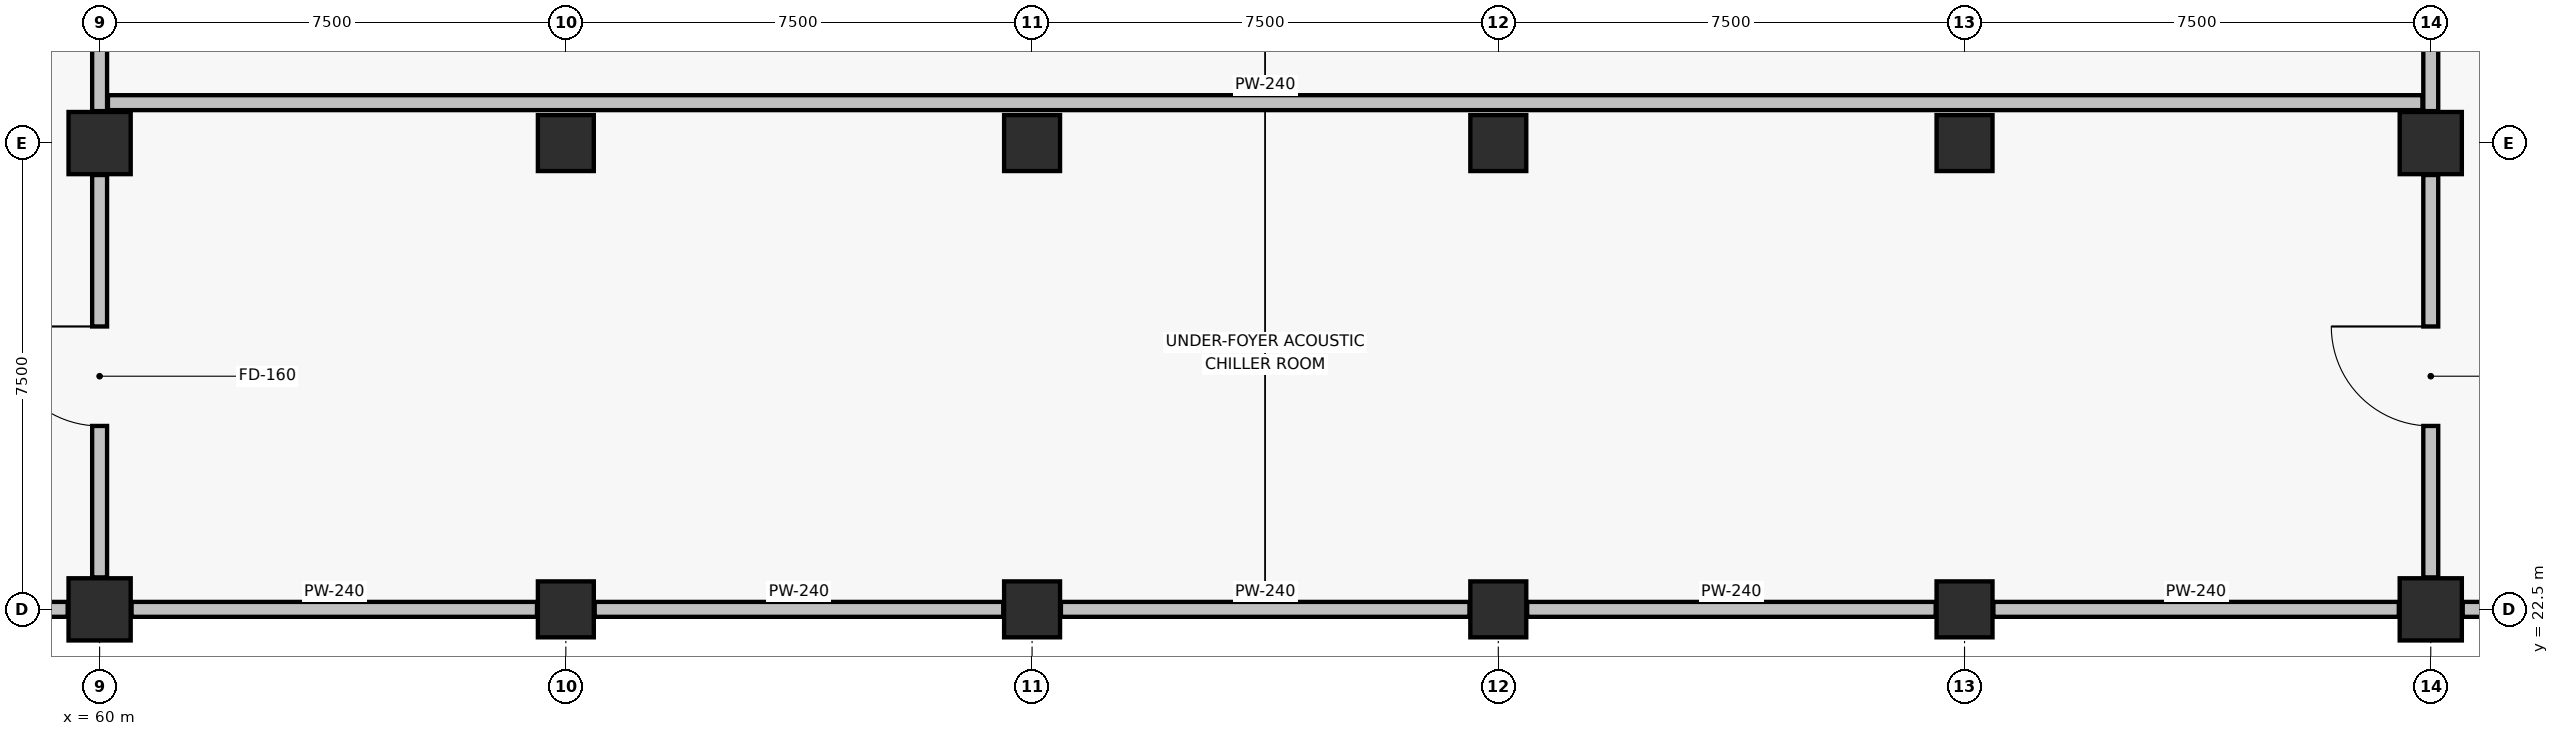
"""IFC4 building model, lengths in metres.
Left out: names, types, materials, properties, quantities, classifications, styles, units other than length and angle.
Written with IfcOpenShell. Run it as: python <this file> out.ifc"""

import sys

from ifc_helpers import new_model, si_unit, direction, frame, frame_2d, origin, origin_2d, place, context, subcontext, project, spatial, rectangle, extrude, element, fill, save


model = new_model("IFC4")
c1 = context("Model", 3, precision=1e-05, world=origin(), true_north=direction((0.0, 1.0)))
c2 = subcontext(c1, "Body", "Model", "MODEL_VIEW")
j1 = project(units=[si_unit("LENGTHUNIT", "METRE"), si_unit("PLANEANGLEUNIT", "RADIAN")], contexts=[c1])
p1 = place(None, origin())
s1 = spatial("IfcSite", under=j1, at=p1, CompositionType="ELEMENT")
p2 = place(p1, origin())
s2 = spatial("IfcBuilding", under=s1, at=p2, CompositionType="ELEMENT")
p3 = place(p2, frame((0.0, 0.0, -4.8)))
s3 = spatial("IfcBuildingStorey", under=s2, at=p3, CompositionType="ELEMENT", Elevation=-4.8)
for number, where, z_axis, x_axis in (
    (1, (60.0, 22.5, 0.0), (0.0, 0.0, 1.0), (1.0, 0.0, 0.0)),
    (2, (60.0, 30.0, 0.0), (0.0, 0.0, 1.0), (1.0, 0.0, 0.0)),
):
    element("IfcColumn", number, at=place(p3, frame(where, z_axis=z_axis, x_axis=x_axis)), inside=s3, PredefinedType="COLUMN", context=c2, shape_type="SweptSolid", body=[
        extrude(rectangle(XDim=1.0, YDim=1.0, at=origin_2d()), origin(), (0.0, 0.0, 1.0), 4.8),
    ])
for number, where, z_axis, x_axis in (
    (3, (67.5, 22.5, 0.0), (0.0, 0.0, 1.0), (1.0, 0.0, 0.0)),
    (4, (67.5, 30.0, 0.0), (0.0, 0.0, 1.0), (1.0, 0.0, 0.0)),
    (5, (75.0, 22.5, 0.0), (0.0, 0.0, 1.0), (1.0, 0.0, 0.0)),
    (6, (75.0, 30.0, 0.0), (0.0, 0.0, 1.0), (1.0, 0.0, 0.0)),
    (7, (82.5, 22.5, 0.0), (0.0, 0.0, 1.0), (1.0, 0.0, 0.0)),
    (8, (82.5, 30.0, 0.0), (0.0, 0.0, 1.0), (1.0, 0.0, 0.0)),
    (9, (90.0, 22.5, 0.0), (0.0, 0.0, 1.0), (1.0, 0.0, 0.0)),
    (10, (90.0, 30.0, 0.0), (0.0, 0.0, 1.0), (1.0, 0.0, 0.0)),
):
    element("IfcColumn", number, at=place(p3, frame(where, z_axis=z_axis, x_axis=x_axis)), inside=s3, PredefinedType="COLUMN", context=c2, shape_type="SweptSolid", body=[
        extrude(rectangle(XDim=0.9, YDim=0.9, at=origin_2d()), origin(), (0.0, 0.0, 1.0), 4.8),
    ])
for number, where, z_axis, x_axis in (
    (11, (97.5, 22.5, 0.0), (0.0, 0.0, 1.0), (1.0, 0.0, 0.0)),
    (12, (97.5, 30.0, 0.0), (0.0, 0.0, 1.0), (1.0, 0.0, 0.0)),
):
    element("IfcColumn", number, at=place(p3, frame(where, z_axis=z_axis, x_axis=x_axis)), inside=s3, PredefinedType="COLUMN", context=c2, shape_type="SweptSolid", body=[
        extrude(rectangle(XDim=1.0, YDim=1.0, at=origin_2d()), origin(), (0.0, 0.0, 1.0), 4.8),
    ])
p4 = place(p3, frame((53.014, 22.5, 0.0), z_axis=(0.0, 0.0, 1.0), x_axis=(1.0, 0.0, 0.0)))
e13 = element("IfcWall", 13, at=p4, inside=s3, PredefinedType="PARTITIONING", context=c2, shape_type="SweptSolid", body=[
    extrude(rectangle(XDim=6.472, YDim=0.24, at=frame_2d((3.236, 0.0))), origin(), (0.0, 0.0, 1.0), 3.87),
])
p5 = place(p3, frame((60.514, 22.5, 0.0), z_axis=(0.0, 0.0, 1.0), x_axis=(1.0, 0.0, 0.0)))
e14 = element("IfcWall", 14, at=p5, inside=s3, PredefinedType="PARTITIONING", context=c2, shape_type="SweptSolid", body=[
    extrude(rectangle(XDim=6.522, YDim=0.24, at=frame_2d((3.261, 0.0))), origin(), (0.0, 0.0, 1.0), 3.82),
])
for number, where, z_axis, x_axis in (
    (15, (67.964, 22.5, 0.0), (0.0, 0.0, 1.0), (1.0, 0.0, 0.0)),
    (16, (75.464, 22.5, 0.0), (0.0, 0.0, 1.0), (1.0, 0.0, 0.0)),
    (17, (82.964, 22.5, 0.0), (0.0, 0.0, 1.0), (1.0, 0.0, 0.0)),
):
    element("IfcWall", number, at=place(p3, frame(where, z_axis=z_axis, x_axis=x_axis)), inside=s3, PredefinedType="PARTITIONING", context=c2, shape_type="SweptSolid", body=[
        extrude(rectangle(XDim=6.572, YDim=0.24, at=frame_2d((3.286, 0.0))), origin(), (0.0, 0.0, 1.0), 3.82),
    ])
p6 = place(p3, frame((90.464, 22.5, 0.0), z_axis=(0.0, 0.0, 1.0), x_axis=(1.0, 0.0, 0.0)))
e18 = element("IfcWall", 18, at=p6, inside=s3, PredefinedType="PARTITIONING", context=c2, shape_type="SweptSolid", body=[
    extrude(rectangle(XDim=6.522, YDim=0.24, at=frame_2d((3.261, 0.0))), origin(), (0.0, 0.0, 1.0), 3.82),
])
p7 = place(p3, frame((98.014, 22.5, 0.0), z_axis=(0.0, 0.0, 1.0), x_axis=(1.0, 0.0, 0.0)))
e19 = element("IfcWall", 19, at=p7, inside=s3, PredefinedType="PARTITIONING", context=c2, shape_type="SweptSolid", body=[
    extrude(rectangle(XDim=6.472, YDim=0.24, at=frame_2d((3.236, 0.0))), origin(), (0.0, 0.0, 1.0), 3.82),
])
p8 = place(p3, frame((60.0, 23.014, 0.0), z_axis=(0.0, 0.0, 1.0), x_axis=(0.0, 1.0, 0.0)))
e20 = element("IfcWall", 20, at=p8, inside=s3, PredefinedType="PARTITIONING", context=c2, shape_type="SweptSolid", body=[
    extrude(rectangle(XDim=6.472, YDim=0.24, at=frame_2d((3.236, 0.0))), origin(), (0.0, 0.0, 1.0), 3.62),
])
p9 = place(p8, frame((2.436, 0.0, 0.0)))
e21 = element("IfcOpeningElement", 21, at=p9, cuts=e20, PredefinedType="OPENING", context=c2, shape_type="SweptSolid", body=[
    extrude(rectangle(XDim=1.6, YDim=2.15, at=frame_2d((0.8, 1.075))), frame((0.0, 0.13, 0.0), z_axis=(0.0, -1.0, 0.0), x_axis=(1.0, 0.0, 0.0)), (0.0, 0.0, 1.0), 0.26),
])
p10 = place(p3, frame((60.0, 30.514, 0.0), z_axis=(0.0, 0.0, 1.0), x_axis=(0.0, 1.0, 0.0)))
e22 = element("IfcWall", 22, at=p10, inside=s3, PredefinedType="PARTITIONING", context=c2, shape_type="SweptSolid", body=[
    extrude(rectangle(XDim=6.472, YDim=0.24, at=frame_2d((3.236, 0.0))), origin(), (0.0, 0.0, 1.0), 2.67),
])
p11 = place(p10, frame((2.436, 0.0, 0.0)))
e23 = element("IfcOpeningElement", 23, at=p11, cuts=e22, PredefinedType="OPENING", context=c2, shape_type="SweptSolid", body=[
    extrude(rectangle(XDim=1.6, YDim=2.15, at=frame_2d((0.8, 1.075))), frame((0.0, 0.13, 0.0), z_axis=(0.0, -1.0, 0.0), x_axis=(1.0, 0.0, 0.0)), (0.0, 0.0, 1.0), 0.26),
])
p12 = place(p3, frame((97.5, 23.014, 0.0), z_axis=(0.0, 0.0, 1.0), x_axis=(0.0, 1.0, 0.0)))
e24 = element("IfcWall", 24, at=p12, inside=s3, PredefinedType="PARTITIONING", context=c2, shape_type="SweptSolid", body=[
    extrude(rectangle(XDim=6.472, YDim=0.24, at=frame_2d((3.236, 0.0))), origin(), (0.0, 0.0, 1.0), 3.52),
])
p13 = place(p12, frame((2.436, 0.0, 0.0)))
e25 = element("IfcOpeningElement", 25, at=p13, cuts=e24, PredefinedType="OPENING", context=c2, shape_type="SweptSolid", body=[
    extrude(rectangle(XDim=1.6, YDim=2.15, at=frame_2d((0.8, 1.075))), frame((0.0, 0.13, 0.0), z_axis=(0.0, -1.0, 0.0), x_axis=(1.0, 0.0, 0.0)), (0.0, 0.0, 1.0), 0.26),
])
p14 = place(p3, frame((97.5, 30.514, 0.0), z_axis=(0.0, 0.0, 1.0), x_axis=(0.0, 1.0, 0.0)))
e26 = element("IfcWall", 26, at=p14, inside=s3, PredefinedType="PARTITIONING", context=c2, shape_type="SweptSolid", body=[
    extrude(rectangle(XDim=6.472, YDim=0.24, at=frame_2d((3.236, 0.0))), origin(), (0.0, 0.0, 1.0), 3.52),
])
p15 = place(p14, frame((2.436, 0.0, 0.0)))
e27 = element("IfcOpeningElement", 27, at=p15, cuts=e26, PredefinedType="OPENING", context=c2, shape_type="SweptSolid", body=[
    extrude(rectangle(XDim=1.6, YDim=2.15, at=frame_2d((0.8, 1.075))), frame((0.0, 0.13, 0.0), z_axis=(0.0, -1.0, 0.0), x_axis=(1.0, 0.0, 0.0)), (0.0, 0.0, 1.0), 0.26),
])
p16 = place(p3, frame((60.134, 30.65, 0.0), z_axis=(0.0, 0.0, 1.0), x_axis=(1.0, 0.0, 0.0)))
e28 = element("IfcWall", 28, at=p16, inside=s3, PredefinedType="PARTITIONING", context=c2, shape_type="SweptSolid", body=[
    extrude(rectangle(XDim=37.232, YDim=0.24, at=frame_2d((18.616, 0.0))), origin(), (0.0, 0.0, 1.0), 3.42),
])
p17 = place(p9, origin())
e29 = element("IfcDoor", 29, at=p17, inside=s3, OperationType="SINGLE_SWING_RIGHT", PredefinedType="DOOR", context=c2, shape_type="SweptSolid", body=[
    extrude(rectangle(XDim=1.6, YDim=2.15, at=frame_2d((0.8, 1.075))), frame((0.0, 0.025, 0.0), z_axis=(0.0, -1.0, 0.0), x_axis=(1.0, 0.0, 0.0)), (0.0, 0.0, 1.0), 0.05),
])
fill(e21, e29)
p18 = place(p13, origin())
e30 = element("IfcDoor", 30, at=p18, inside=s3, OperationType="SINGLE_SWING_RIGHT", PredefinedType="DOOR", context=c2, shape_type="SweptSolid", body=[
    extrude(rectangle(XDim=1.6, YDim=2.15, at=frame_2d((0.8, 1.075))), frame((0.0, 0.025, 0.0), z_axis=(0.0, -1.0, 0.0), x_axis=(1.0, 0.0, 0.0)), (0.0, 0.0, 1.0), 0.05),
])
fill(e25, e30)
save(model, sys.argv[1])
